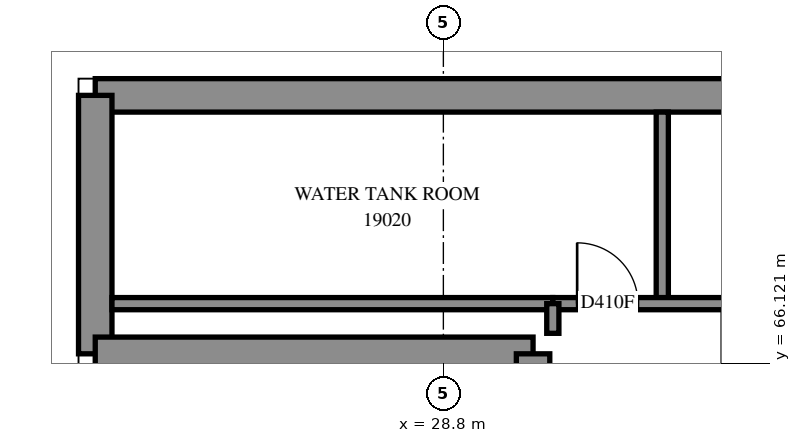
"""IFC4 building model, lengths in metres.
Left out: names, types, materials, properties, quantities, classifications, styles, units other than length and angle.
Written with IfcOpenShell. Run it as: python <this file> out.ifc"""

import sys

from ifc_helpers import new_model, si_unit, direction, frame, frame_2d, origin, place, context, subcontext, project, spatial, polyline, rectangle, outline, extrude, element, fill, save


model = new_model("IFC4")
c1 = context("Model", 3, precision=1e-05, world=origin(), true_north=direction((0.0, 1.0)))
c2 = subcontext(c1, "Body", "Model", "MODEL_VIEW")
j1 = project(units=[si_unit("LENGTHUNIT", "METRE"), si_unit("PLANEANGLEUNIT", "RADIAN")], contexts=[c1])
p1 = place(None, origin())
s1 = spatial("IfcSite", under=j1, at=p1, CompositionType="ELEMENT")
p2 = place(p1, origin())
s2 = spatial("IfcBuilding", under=s1, at=p2, CompositionType="ELEMENT")
p3 = place(p2, frame((0.0, 0.0, 72.0)))
s3 = spatial("IfcBuildingStorey", under=s2, at=p3, CompositionType="ELEMENT", Elevation=72.0)
p4 = place(p3, frame((78.589, 70.525, 0.0), z_axis=(0.0, 0.0, 1.0), x_axis=(-1.0, 0.0, 0.0)))
e1 = element("IfcWall", 1, at=p4, inside=s3, PredefinedType="SOLIDWALL", context=c2, shape_type="SweptSolid", body=[
    extrude(outline(polyline([(-0.114, -0.275), (55.789, -0.275), (55.239, 0.275), (0.114, 0.275), (-0.114, -0.275)])), origin(), (0.0, 0.0, 1.0), 4.7),
])
p5 = place(p3, frame((23.075, 70.525, 0.0), z_axis=(0.0, 0.0, 1.0), x_axis=(0.0, -1.0, 0.0)))
e2 = element("IfcWall", 2, at=p5, inside=s3, PredefinedType="SOLIDWALL", context=c2, shape_type="SweptSolid", body=[
    extrude(outline(polyline([(-0.275, -0.275), (4.525, -0.275), (3.975, 0.275), (0.275, 0.275), (-0.275, -0.275)])), origin(), (0.0, 0.0, 1.0), 4.7),
])
p6 = place(p3, frame((23.075, 66.275, 0.0), z_axis=(0.0, 0.0, 1.0), x_axis=(1.0, 0.0, 0.0)))
e3 = element("IfcWall", 3, at=p6, inside=s3, PredefinedType="SOLIDWALL", context=c2, shape_type="SweptSolid", body=[
    extrude(outline(polyline([(-0.275, -0.275), (6.925, -0.275), (7.475, 0.275), (0.275, 0.275), (-0.275, -0.275)])), origin(), (0.0, 0.0, 1.0), 4.7),
])
p7 = place(p3, frame((30.275, 66.275, 0.0), z_axis=(0.0, 0.0, 1.0), x_axis=(0.0, -1.0, 0.0)))
e4 = element("IfcWall", 4, at=p7, inside=s3, PredefinedType="SOLIDWALL", context=c2, shape_type="SweptSolid", body=[
    extrude(outline(polyline([(0.275, -0.275), (7.475, -0.275), (6.925, 0.275), (-0.275, 0.275), (0.275, -0.275)])), origin(), (0.0, 0.0, 1.0), 4.7),
])
p8 = place(p3, frame((23.35, 67.1, 0.0), z_axis=(0.0, 0.0, 1.0), x_axis=(1.0, 0.0, 0.0)))
e5 = element("IfcWall", 5, at=p8, inside=s3, PredefinedType="PARTITIONING", context=c2, shape_type="SweptSolid", body=[
    extrude(rectangle(XDim=7.25, YDim=0.2, at=frame_2d((3.625, 0.0))), origin(), (0.0, 0.0, 1.0), 4.7),
])
p9 = place(p3, frame((32.4, 67.1, 0.0), z_axis=(0.0, 0.0, 1.0), x_axis=(0.0, 1.0, 0.0)))
e6 = element("IfcWall", 6, at=p9, inside=s3, PredefinedType="PARTITIONING", context=c2, shape_type="SweptSolid", body=[
    extrude(rectangle(XDim=3.15, YDim=0.2, at=frame_2d((1.575, 0.0))), origin(), (0.0, 0.0, 1.0), 4.7),
])
p10 = place(p3, frame((30.6, 67.1, 0.0), z_axis=(0.0, 0.0, 1.0), x_axis=(1.0, 0.0, 0.0)))
e7 = element("IfcWall", 7, at=p10, inside=s3, PredefinedType="PARTITIONING", context=c2, shape_type="SweptSolid", body=[
    extrude(rectangle(XDim=2.9, YDim=0.2, at=frame_2d((1.45, 0.0))), origin(), (0.0, 0.0, 1.0), 4.7),
])
p11 = place(p10, frame((0.4, 0.0, 0.0)))
e8 = element("IfcOpeningElement", 8, at=p11, cuts=e7, PredefinedType="OPENING", context=c2, shape_type="SweptSolid", body=[
    extrude(rectangle(XDim=1.0, YDim=2.1, at=frame_2d((0.5, 1.05))), frame((0.0, 0.11, 0.0), z_axis=(0.0, -1.0, 0.0), x_axis=(1.0, 0.0, 0.0)), (0.0, 0.0, 1.0), 0.22),
])
p12 = place(p3, frame((30.6, 66.612, 0.0), z_axis=(0.0, 0.0, 1.0), x_axis=(0.0, 1.0, 0.0)))
e9 = element("IfcWall", 9, at=p12, inside=s3, PredefinedType="PARTITIONING", context=c2, shape_type="SweptSolid", body=[
    extrude(rectangle(XDim=0.488, YDim=0.2, at=frame_2d((0.244, 0.0))), origin(), (0.0, 0.0, 1.0), 4.7),
])
p13 = place(p11, origin())
e10 = element("IfcDoor", 10, at=p13, inside=s3, OperationType="SINGLE_SWING_RIGHT", PredefinedType="DOOR", context=c2, shape_type="SweptSolid", body=[
    extrude(rectangle(XDim=1.0, YDim=2.1, at=frame_2d((0.5, 1.05))), frame((0.0, 0.025, 0.0), z_axis=(0.0, -1.0, 0.0), x_axis=(1.0, 0.0, 0.0)), (0.0, 0.0, 1.0), 0.05),
])
fill(e8, e10)
save(model, sys.argv[1])
